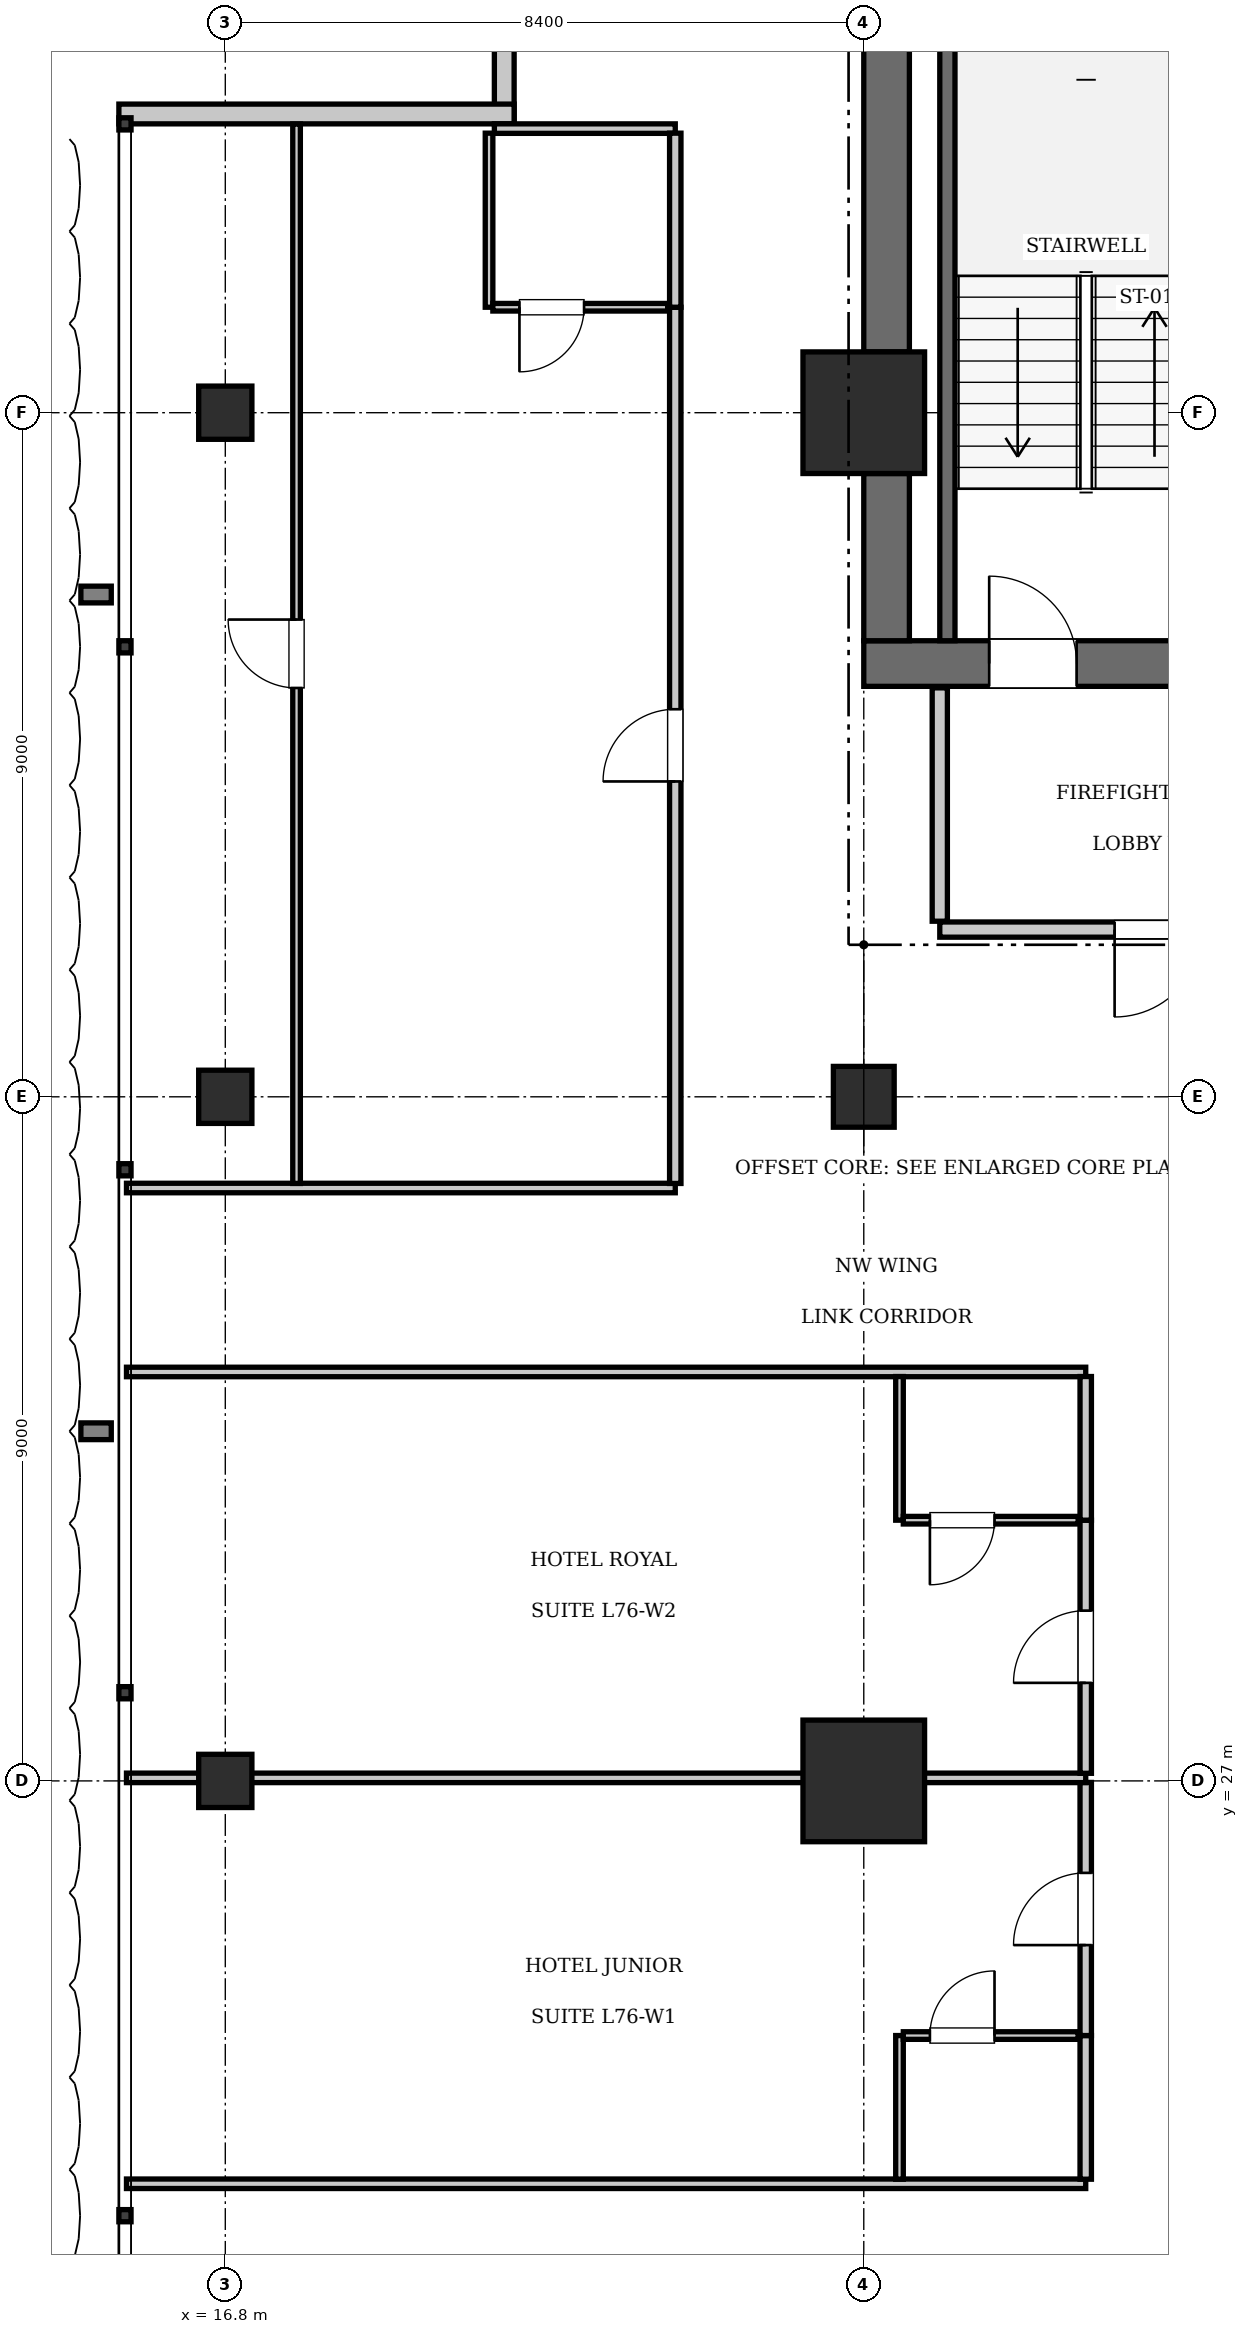
"""IFC4 building model, lengths in metres.
Left out: names, types, materials, properties, quantities, classifications, styles, units other than length and angle.
Written with IfcOpenShell. Run it as: python <this file> out.ifc"""

import sys

from ifc_helpers import new_model, si_unit, direction, frame, frame_2d, origin, origin_2d, place, context, subcontext, project, spatial, rectangle, extrude, element, fill, save


model = new_model("IFC4")
c1 = context("Model", 3, precision=1e-05, world=origin(), true_north=direction((0.0, 1.0)))
c2 = subcontext(c1, "Body", "Model", "MODEL_VIEW")
j1 = project(units=[si_unit("LENGTHUNIT", "METRE"), si_unit("PLANEANGLEUNIT", "RADIAN")], contexts=[c1])
p1 = place(None, origin())
s1 = spatial("IfcSite", under=j1, at=p1, CompositionType="ELEMENT")
p2 = place(p1, origin())
s2 = spatial("IfcBuilding", under=s1, at=p2, CompositionType="ELEMENT")
p3 = place(p2, frame((0.0, 0.0, 308.7)))
s3 = spatial("IfcBuildingStorey", under=s2, at=p3, CompositionType="ELEMENT", Elevation=308.7)
for number, where, z_axis, x_axis in (
    (1, (25.2, 27.0, 0.0), (0.0, 0.0, 1.0), (1.0, 0.0, 0.0)),
    (2, (25.2, 45.0, 0.0), (0.0, 0.0, 1.0), (1.0, 0.0, 0.0)),
):
    element("IfcColumn", number, at=place(p3, frame(where, z_axis=z_axis, x_axis=x_axis)), inside=s3, PredefinedType="COLUMN", context=c2, shape_type="SweptSolid", body=[
        extrude(rectangle(XDim=1.6, YDim=1.6, at=origin_2d()), origin(), (0.0, 0.0, 1.0), 3.85),
    ])
p4 = place(p3, frame((25.2, 41.7, 0.0), z_axis=(0.0, 0.0, 1.0), x_axis=(1.0, 0.0, 0.0)))
e3 = element("IfcWall", 3, at=p4, inside=s3, PredefinedType="SHEAR", context=c2, shape_type="SweptSolid", body=[
    extrude(rectangle(XDim=6.8, YDim=0.6, at=frame_2d((3.4, 0.0))), origin(), (0.0, 0.0, 1.0), 3.85),
])
p5 = place(p4, frame((1.65, 0.0, 0.0)))
e4 = element("IfcOpeningElement", 4, at=p5, cuts=e3, PredefinedType="OPENING", context=c2, shape_type="SweptSolid", body=[
    extrude(rectangle(XDim=1.15, YDim=2.15, at=frame_2d((0.575, 1.075))), frame((0.0, 0.31, 0.0), z_axis=(0.0, -1.0, 0.0), x_axis=(1.0, 0.0, 0.0)), (0.0, 0.0, 1.0), 0.62),
])
p6 = place(p4, frame((5.15, 0.0, 0.0)))
e5 = element("IfcOpeningElement", 5, at=p6, cuts=e3, PredefinedType="OPENING", context=c2, shape_type="SweptSolid", body=[
    extrude(rectangle(XDim=1.1, YDim=2.2, at=frame_2d((0.55, 1.1))), frame((0.0, 0.31, 0.0), z_axis=(0.0, -1.0, 0.0), x_axis=(1.0, 0.0, 0.0)), (0.0, 0.0, 1.0), 0.62),
])
p7 = place(p3, frame((25.5, 42.0, 0.0), z_axis=(0.0, 0.0, 1.0), x_axis=(0.0, 1.0, 0.0)))
e6 = element("IfcWall", 6, at=p7, inside=s3, PredefinedType="SHEAR", context=c2, shape_type="SweptSolid", body=[
    extrude(rectangle(XDim=2.2, YDim=0.6, at=frame_2d((1.1, 0.0))), origin(), (0.0, 0.0, 1.0), 3.85),
])
p8 = place(p3, frame((25.5, 45.8, 0.0), z_axis=(0.0, 0.0, 1.0), x_axis=(0.0, 1.0, 0.0)))
e7 = element("IfcWall", 7, at=p8, inside=s3, PredefinedType="SHEAR", context=c2, shape_type="SweptSolid", body=[
    extrude(rectangle(XDim=7.6, YDim=0.6, at=frame_2d((3.8, 0.0))), origin(), (0.0, 0.0, 1.0), 3.85),
])
p9 = place(p3, frame((25.2, 36.0, 0.0), z_axis=(0.0, 0.0, 1.0), x_axis=(1.0, 0.0, 0.0)))
e8 = element("IfcColumn", 8, at=p9, inside=s3, PredefinedType="COLUMN", context=c2, shape_type="SweptSolid", body=[
    extrude(rectangle(XDim=0.8, YDim=0.8, at=origin_2d()), origin(), (0.0, 0.0, 1.0), 3.85),
])
for number, where, z_axis, x_axis in (
    (9, (16.8, 27.0, 0.0), (0.0, 0.0, 1.0), (1.0, 0.0, 0.0)),
    (10, (16.8, 36.0, 0.0), (0.0, 0.0, 1.0), (1.0, 0.0, 0.0)),
    (11, (16.8, 45.0, 0.0), (0.0, 0.0, 1.0), (1.0, 0.0, 0.0)),
):
    element("IfcColumn", number, at=place(p3, frame(where, z_axis=z_axis, x_axis=x_axis)), inside=s3, PredefinedType="COLUMN", context=c2, shape_type="SweptSolid", body=[
        extrude(rectangle(XDim=0.7, YDim=0.7, at=origin_2d()), origin(), (0.0, 0.0, 1.0), 3.85),
    ])
p10 = place(p3, frame((26.3, 42.0, 0.0), z_axis=(0.0, 0.0, 1.0), x_axis=(0.0, 1.0, 0.0)))
e12 = element("IfcWall", 12, at=p10, inside=s3, PredefinedType="SOLIDWALL", context=c2, shape_type="SweptSolid", body=[
    extrude(rectangle(XDim=9.12, YDim=0.2, at=frame_2d((4.56, 0.0))), origin(), (0.0, 0.0, 1.0), 3.61),
])
p11 = place(p3, frame((20.47, 48.8, 0.0), z_axis=(0.0, 0.0, 1.0), x_axis=(0.0, 1.0, 0.0)))
e13 = element("IfcWall", 13, at=p11, inside=s3, PredefinedType="SOLIDWALL", context=c2, shape_type="SweptSolid", body=[
    extrude(rectangle(XDim=5.2, YDim=0.26, at=frame_2d((2.6, 0.0))), origin(), (0.0, 0.0, 1.0), 3.61),
])
p12 = place(p3, frame((15.4, 48.93, 0.0), z_axis=(0.0, 0.0, 1.0), x_axis=(1.0, 0.0, 0.0)))
e14 = element("IfcWall", 14, at=p12, inside=s3, PredefinedType="SOLIDWALL", context=c2, shape_type="SweptSolid", body=[
    extrude(rectangle(XDim=5.2, YDim=0.26, at=frame_2d((2.6, 0.0))), origin(), (0.0, 0.0, 1.0), 3.61),
])
p13 = place(p3, frame((26.2, 38.2, 0.0), z_axis=(0.0, 0.0, 1.0), x_axis=(1.0, 0.0, 0.0)))
e15 = element("IfcWall", 15, at=p13, inside=s3, PredefinedType="PARTITIONING", context=c2, shape_type="SweptSolid", body=[
    extrude(rectangle(XDim=5.8, YDim=0.2, at=frame_2d((2.9, 0.0))), origin(), (0.0, 0.0, 1.0), 3.61),
])
p14 = place(p13, frame((2.3, 0.0, 0.0)))
e16 = element("IfcOpeningElement", 16, at=p14, cuts=e15, PredefinedType="OPENING", context=c2, shape_type="SweptSolid", body=[
    extrude(rectangle(XDim=1.15, YDim=2.15, at=frame_2d((0.575, 1.075))), frame((0.0, 0.11, 0.0), z_axis=(0.0, -1.0, 0.0), x_axis=(1.0, 0.0, 0.0)), (0.0, 0.0, 1.0), 0.22),
])
p15 = place(p3, frame((26.2, 38.31, 0.0), z_axis=(0.0, 0.0, 1.0), x_axis=(0.0, 1.0, 0.0)))
e17 = element("IfcWall", 17, at=p15, inside=s3, PredefinedType="PARTITIONING", context=c2, shape_type="SweptSolid", body=[
    extrude(rectangle(XDim=3.07, YDim=0.2, at=frame_2d((1.535, 0.0))), origin(), (0.0, 0.0, 1.0), 3.61),
])
for number, where, z_axis, x_axis in (
    (18, (15.5, 21.7, 0.0), (0.0, 0.0, 1.0), (1.0, 0.0, 0.0)),
    (19, (15.5, 32.38, 0.0), (0.0, 0.0, 1.0), (1.0, 0.0, 0.0)),
):
    element("IfcWall", number, at=place(p3, frame(where, z_axis=z_axis, x_axis=x_axis)), inside=s3, PredefinedType="PARTITIONING", context=c2, shape_type="SweptSolid", body=[
        extrude(rectangle(XDim=12.62, YDim=0.125, at=frame_2d((6.31, 0.0))), origin(), (0.0, 0.0, 1.0), 3.61),
    ])
p16 = place(p3, frame((28.12, 21.76, 0.0), z_axis=(0.0, 0.0, 1.0), x_axis=(0.0, 1.0, 0.0)))
e20 = element("IfcWall", 20, at=p16, inside=s3, PredefinedType="PARTITIONING", context=c2, shape_type="SweptSolid", body=[
    extrude(rectangle(XDim=1.89, YDim=0.15, at=frame_2d((0.945, 0.0))), origin(), (0.0, 0.0, 1.0), 3.61),
])
p17 = place(p3, frame((28.12, 23.65, 0.0), z_axis=(0.0, 0.0, 1.0), x_axis=(0.0, 1.0, 0.0)))
e21 = element("IfcWall", 21, at=p17, inside=s3, PredefinedType="PARTITIONING", context=c2, shape_type="SweptSolid", body=[
    extrude(rectangle(XDim=3.33, YDim=0.15, at=frame_2d((1.665, 0.0))), origin(), (0.0, 0.0, 1.0), 3.61),
])
p18 = place(p17, frame((1.19, 0.0, 0.0)))
e22 = element("IfcOpeningElement", 22, at=p18, cuts=e21, PredefinedType="OPENING", context=c2, shape_type="SweptSolid", body=[
    extrude(rectangle(XDim=0.95, YDim=2.15, at=frame_2d((0.475, 1.075))), frame((0.0, 0.085, 0.0), z_axis=(0.0, -1.0, 0.0), x_axis=(1.0, 0.0, 0.0)), (0.0, 0.0, 1.0), 0.17),
])
p19 = place(p3, frame((25.67, 21.76, 0.0), z_axis=(0.0, 0.0, 1.0), x_axis=(0.0, 1.0, 0.0)))
e23 = element("IfcWall", 23, at=p19, inside=s3, PredefinedType="PARTITIONING", context=c2, shape_type="SweptSolid", body=[
    extrude(rectangle(XDim=1.89, YDim=0.1, at=frame_2d((0.945, 0.0))), origin(), (0.0, 0.0, 1.0), 3.61),
])
p20 = place(p3, frame((25.72, 23.65, 0.0), z_axis=(0.0, 0.0, 1.0), x_axis=(1.0, 0.0, 0.0)))
e24 = element("IfcWall", 24, at=p20, inside=s3, PredefinedType="PARTITIONING", context=c2, shape_type="SweptSolid", body=[
    extrude(rectangle(XDim=2.3, YDim=0.1, at=frame_2d((1.15, 0.0))), origin(), (0.0, 0.0, 1.0), 3.61),
])
p21 = place(p20, frame((0.35, 0.0, 0.0)))
e25 = element("IfcOpeningElement", 25, at=p21, cuts=e24, PredefinedType="OPENING", context=c2, shape_type="SweptSolid", body=[
    extrude(rectangle(XDim=0.85, YDim=2.1, at=frame_2d((0.425, 1.05))), frame((0.0, 0.06, 0.0), z_axis=(0.0, -1.0, 0.0), x_axis=(1.0, 0.0, 0.0)), (0.0, 0.0, 1.0), 0.12),
])
p22 = place(p3, frame((15.5, 27.04, 0.0), z_axis=(0.0, 0.0, 1.0), x_axis=(1.0, 0.0, 0.0)))
e26 = element("IfcWall", 26, at=p22, inside=s3, PredefinedType="PARTITIONING", context=c2, shape_type="SweptSolid", body=[
    extrude(rectangle(XDim=12.62, YDim=0.125, at=frame_2d((6.31, 0.0))), origin(), (0.0, 0.0, 1.0), 2.41),
])
p23 = place(p3, frame((28.12, 27.1, 0.0), z_axis=(0.0, 0.0, 1.0), x_axis=(0.0, 1.0, 0.0)))
e27 = element("IfcWall", 27, at=p23, inside=s3, PredefinedType="PARTITIONING", context=c2, shape_type="SweptSolid", body=[
    extrude(rectangle(XDim=3.33, YDim=0.15, at=frame_2d((1.665, 0.0))), origin(), (0.0, 0.0, 1.0), 3.61),
])
p24 = place(p23, frame((1.19, 0.0, 0.0)))
e28 = element("IfcOpeningElement", 28, at=p24, cuts=e27, PredefinedType="OPENING", context=c2, shape_type="SweptSolid", body=[
    extrude(rectangle(XDim=0.95, YDim=2.15, at=frame_2d((0.475, 1.075))), frame((0.0, 0.085, 0.0), z_axis=(0.0, -1.0, 0.0), x_axis=(1.0, 0.0, 0.0)), (0.0, 0.0, 1.0), 0.17),
])
p25 = place(p3, frame((28.12, 30.43, 0.0), z_axis=(0.0, 0.0, 1.0), x_axis=(0.0, 1.0, 0.0)))
e29 = element("IfcWall", 29, at=p25, inside=s3, PredefinedType="PARTITIONING", context=c2, shape_type="SweptSolid", body=[
    extrude(rectangle(XDim=1.89, YDim=0.15, at=frame_2d((0.945, 0.0))), origin(), (0.0, 0.0, 1.0), 3.61),
])
p26 = place(p3, frame((25.67, 30.43, 0.0), z_axis=(0.0, 0.0, 1.0), x_axis=(0.0, 1.0, 0.0)))
e30 = element("IfcWall", 30, at=p26, inside=s3, PredefinedType="PARTITIONING", context=c2, shape_type="SweptSolid", body=[
    extrude(rectangle(XDim=1.89, YDim=0.1, at=frame_2d((0.945, 0.0))), origin(), (0.0, 0.0, 1.0), 3.61),
])
p27 = place(p3, frame((25.72, 30.43, 0.0), z_axis=(0.0, 0.0, 1.0), x_axis=(1.0, 0.0, 0.0)))
e31 = element("IfcWall", 31, at=p27, inside=s3, PredefinedType="PARTITIONING", context=c2, shape_type="SweptSolid", body=[
    extrude(rectangle(XDim=2.3, YDim=0.1, at=frame_2d((1.15, 0.0))), origin(), (0.0, 0.0, 1.0), 3.61),
])
p28 = place(p27, frame((0.35, 0.0, 0.0)))
e32 = element("IfcOpeningElement", 32, at=p28, cuts=e31, PredefinedType="OPENING", context=c2, shape_type="SweptSolid", body=[
    extrude(rectangle(XDim=0.85, YDim=2.1, at=frame_2d((0.425, 1.05))), frame((0.0, 0.06, 0.0), z_axis=(0.0, -1.0, 0.0), x_axis=(1.0, 0.0, 0.0)), (0.0, 0.0, 1.0), 0.12),
])
p29 = place(p3, frame((15.5, 34.8, 0.0), z_axis=(0.0, 0.0, 1.0), x_axis=(1.0, 0.0, 0.0)))
e33 = element("IfcWall", 33, at=p29, inside=s3, PredefinedType="PARTITIONING", context=c2, shape_type="SweptSolid", body=[
    extrude(rectangle(XDim=7.22, YDim=0.125, at=frame_2d((3.61, 0.0))), origin(), (0.0, 0.0, 1.0), 3.61),
])
p30 = place(p3, frame((20.34, 48.738, 0.0), z_axis=(0.0, 0.0, 1.0), x_axis=(1.0, 0.0, 0.0)))
e34 = element("IfcWall", 34, at=p30, inside=s3, PredefinedType="PARTITIONING", context=c2, shape_type="SweptSolid", body=[
    extrude(rectangle(XDim=2.38, YDim=0.125, at=frame_2d((1.19, 0.0))), origin(), (0.0, 0.0, 1.0), 3.61),
])
p31 = place(p3, frame((22.72, 34.86, 0.0), z_axis=(0.0, 0.0, 1.0), x_axis=(0.0, 1.0, 0.0)))
e35 = element("IfcWall", 35, at=p31, inside=s3, PredefinedType="PARTITIONING", context=c2, shape_type="SweptSolid", body=[
    extrude(rectangle(XDim=11.527, YDim=0.15, at=frame_2d((5.764, 0.0))), origin(), (0.0, 0.0, 1.0), 3.61),
])
p32 = place(p31, frame((5.289, 0.0, 0.0)))
e36 = element("IfcOpeningElement", 36, at=p32, cuts=e35, PredefinedType="OPENING", context=c2, shape_type="SweptSolid", body=[
    extrude(rectangle(XDim=0.95, YDim=2.15, at=frame_2d((0.475, 1.075))), frame((0.0, 0.085, 0.0), z_axis=(0.0, -1.0, 0.0), x_axis=(1.0, 0.0, 0.0)), (0.0, 0.0, 1.0), 0.17),
])
p33 = place(p3, frame((22.72, 46.387, 0.0), z_axis=(0.0, 0.0, 1.0), x_axis=(0.0, 1.0, 0.0)))
e37 = element("IfcWall", 37, at=p33, inside=s3, PredefinedType="PARTITIONING", context=c2, shape_type="SweptSolid", body=[
    extrude(rectangle(XDim=2.29, YDim=0.15, at=frame_2d((1.145, 0.0))), origin(), (0.0, 0.0, 1.0), 3.61),
])
p34 = place(p3, frame((20.27, 46.387, 0.0), z_axis=(0.0, 0.0, 1.0), x_axis=(0.0, 1.0, 0.0)))
e38 = element("IfcWall", 38, at=p34, inside=s3, PredefinedType="PARTITIONING", context=c2, shape_type="SweptSolid", body=[
    extrude(rectangle(XDim=2.29, YDim=0.1, at=frame_2d((1.145, 0.0))), origin(), (0.0, 0.0, 1.0), 3.61),
])
p35 = place(p3, frame((20.32, 46.387, 0.0), z_axis=(0.0, 0.0, 1.0), x_axis=(1.0, 0.0, 0.0)))
e39 = element("IfcWall", 39, at=p35, inside=s3, PredefinedType="PARTITIONING", context=c2, shape_type="SweptSolid", body=[
    extrude(rectangle(XDim=2.3, YDim=0.1, at=frame_2d((1.15, 0.0))), origin(), (0.0, 0.0, 1.0), 3.61),
])
p36 = place(p35, frame((0.35, 0.0, 0.0)))
e40 = element("IfcOpeningElement", 40, at=p36, cuts=e39, PredefinedType="OPENING", context=c2, shape_type="SweptSolid", body=[
    extrude(rectangle(XDim=0.85, YDim=2.1, at=frame_2d((0.425, 1.05))), frame((0.0, 0.06, 0.0), z_axis=(0.0, -1.0, 0.0), x_axis=(1.0, 0.0, 0.0)), (0.0, 0.0, 1.0), 0.12),
])
p37 = place(p3, frame((17.738, 34.86, 0.0), z_axis=(0.0, 0.0, 1.0), x_axis=(0.0, 1.0, 0.0)))
e41 = element("IfcWall", 41, at=p37, inside=s3, PredefinedType="PARTITIONING", context=c2, shape_type="SweptSolid", body=[
    extrude(rectangle(XDim=13.938, YDim=0.1, at=frame_2d((6.969, 0.0))), origin(), (0.0, 0.0, 1.0), 3.61),
])
p38 = place(p37, frame((6.519, 0.0, 0.0)))
e42 = element("IfcOpeningElement", 42, at=p38, cuts=e41, PredefinedType="OPENING", context=c2, shape_type="SweptSolid", body=[
    extrude(rectangle(XDim=0.9, YDim=2.1, at=frame_2d((0.45, 1.05))), frame((0.0, 0.06, 0.0), z_axis=(0.0, -1.0, 0.0), x_axis=(1.0, 0.0, 0.0)), (0.0, 0.0, 1.0), 0.12),
])
p39 = place(p5, origin())
e43 = element("IfcDoor", 43, at=p39, inside=s3, OperationType="SINGLE_SWING_LEFT", PredefinedType="DOOR", context=c2, shape_type="SweptSolid", body=[
    extrude(rectangle(XDim=1.15, YDim=2.15, at=frame_2d((0.575, 1.075))), frame((0.0, 0.025, 0.0), z_axis=(0.0, -1.0, 0.0), x_axis=(1.0, 0.0, 0.0)), (0.0, 0.0, 1.0), 0.05),
])
fill(e4, e43)
p40 = place(p14, frame((1.15, 0.0, 0.0), z_axis=(0.0, 0.0, 1.0), x_axis=(-1.0, 0.0, 0.0)))
e44 = element("IfcDoor", 44, at=p40, inside=s3, OperationType="SINGLE_SWING_RIGHT", PredefinedType="DOOR", context=c2, shape_type="SweptSolid", body=[
    extrude(rectangle(XDim=1.15, YDim=2.15, at=frame_2d((0.575, 1.075))), frame((0.0, 0.025, 0.0), z_axis=(0.0, -1.0, 0.0), x_axis=(1.0, 0.0, 0.0)), (0.0, 0.0, 1.0), 0.05),
])
fill(e16, e44)
p41 = place(p21, origin())
e45 = element("IfcDoor", 45, at=p41, inside=s3, OperationType="SINGLE_SWING_RIGHT", PredefinedType="DOOR", context=c2, shape_type="SweptSolid", body=[
    extrude(rectangle(XDim=0.85, YDim=2.1, at=frame_2d((0.425, 1.05))), frame((0.0, 0.025, 0.0), z_axis=(0.0, -1.0, 0.0), x_axis=(1.0, 0.0, 0.0)), (0.0, 0.0, 1.0), 0.05),
])
fill(e25, e45)
p42 = place(p18, origin())
e46 = element("IfcDoor", 46, at=p42, inside=s3, OperationType="SINGLE_SWING_LEFT", PredefinedType="DOOR", context=c2, shape_type="SweptSolid", body=[
    extrude(rectangle(XDim=0.95, YDim=2.15, at=frame_2d((0.475, 1.075))), frame((0.0, 0.025, 0.0), z_axis=(0.0, -1.0, 0.0), x_axis=(1.0, 0.0, 0.0)), (0.0, 0.0, 1.0), 0.05),
])
fill(e22, e46)
p43 = place(p28, frame((0.85, 0.0, 0.0), z_axis=(0.0, 0.0, 1.0), x_axis=(-1.0, 0.0, 0.0)))
e47 = element("IfcDoor", 47, at=p43, inside=s3, OperationType="SINGLE_SWING_RIGHT", PredefinedType="DOOR", context=c2, shape_type="SweptSolid", body=[
    extrude(rectangle(XDim=0.85, YDim=2.1, at=frame_2d((0.425, 1.05))), frame((0.0, 0.025, 0.0), z_axis=(0.0, -1.0, 0.0), x_axis=(1.0, 0.0, 0.0)), (0.0, 0.0, 1.0), 0.05),
])
fill(e32, e47)
p44 = place(p24, origin())
e48 = element("IfcDoor", 48, at=p44, inside=s3, OperationType="SINGLE_SWING_LEFT", PredefinedType="DOOR", context=c2, shape_type="SweptSolid", body=[
    extrude(rectangle(XDim=0.95, YDim=2.15, at=frame_2d((0.475, 1.075))), frame((0.0, 0.025, 0.0), z_axis=(0.0, -1.0, 0.0), x_axis=(1.0, 0.0, 0.0)), (0.0, 0.0, 1.0), 0.05),
])
fill(e28, e48)
p45 = place(p36, frame((0.85, 0.0, 0.0), z_axis=(0.0, 0.0, 1.0), x_axis=(-1.0, 0.0, 0.0)))
e49 = element("IfcDoor", 49, at=p45, inside=s3, OperationType="SINGLE_SWING_RIGHT", PredefinedType="DOOR", context=c2, shape_type="SweptSolid", body=[
    extrude(rectangle(XDim=0.85, YDim=2.1, at=frame_2d((0.425, 1.05))), frame((0.0, 0.025, 0.0), z_axis=(0.0, -1.0, 0.0), x_axis=(1.0, 0.0, 0.0)), (0.0, 0.0, 1.0), 0.05),
])
fill(e40, e49)
p46 = place(p32, origin())
e50 = element("IfcDoor", 50, at=p46, inside=s3, OperationType="SINGLE_SWING_LEFT", PredefinedType="DOOR", context=c2, shape_type="SweptSolid", body=[
    extrude(rectangle(XDim=0.95, YDim=2.15, at=frame_2d((0.475, 1.075))), frame((0.0, 0.025, 0.0), z_axis=(0.0, -1.0, 0.0), x_axis=(1.0, 0.0, 0.0)), (0.0, 0.0, 1.0), 0.05),
])
fill(e36, e50)
p47 = place(p38, origin())
e51 = element("IfcDoor", 51, at=p47, inside=s3, OperationType="SINGLE_SWING_RIGHT", PredefinedType="DOOR", context=c2, shape_type="SweptSolid", body=[
    extrude(rectangle(XDim=0.9, YDim=2.1, at=frame_2d((0.45, 1.05))), frame((0.0, 0.025, 0.0), z_axis=(0.0, -1.0, 0.0), x_axis=(1.0, 0.0, 0.0)), (0.0, 0.0, 1.0), 0.05),
])
fill(e42, e51)
save(model, sys.argv[1])
